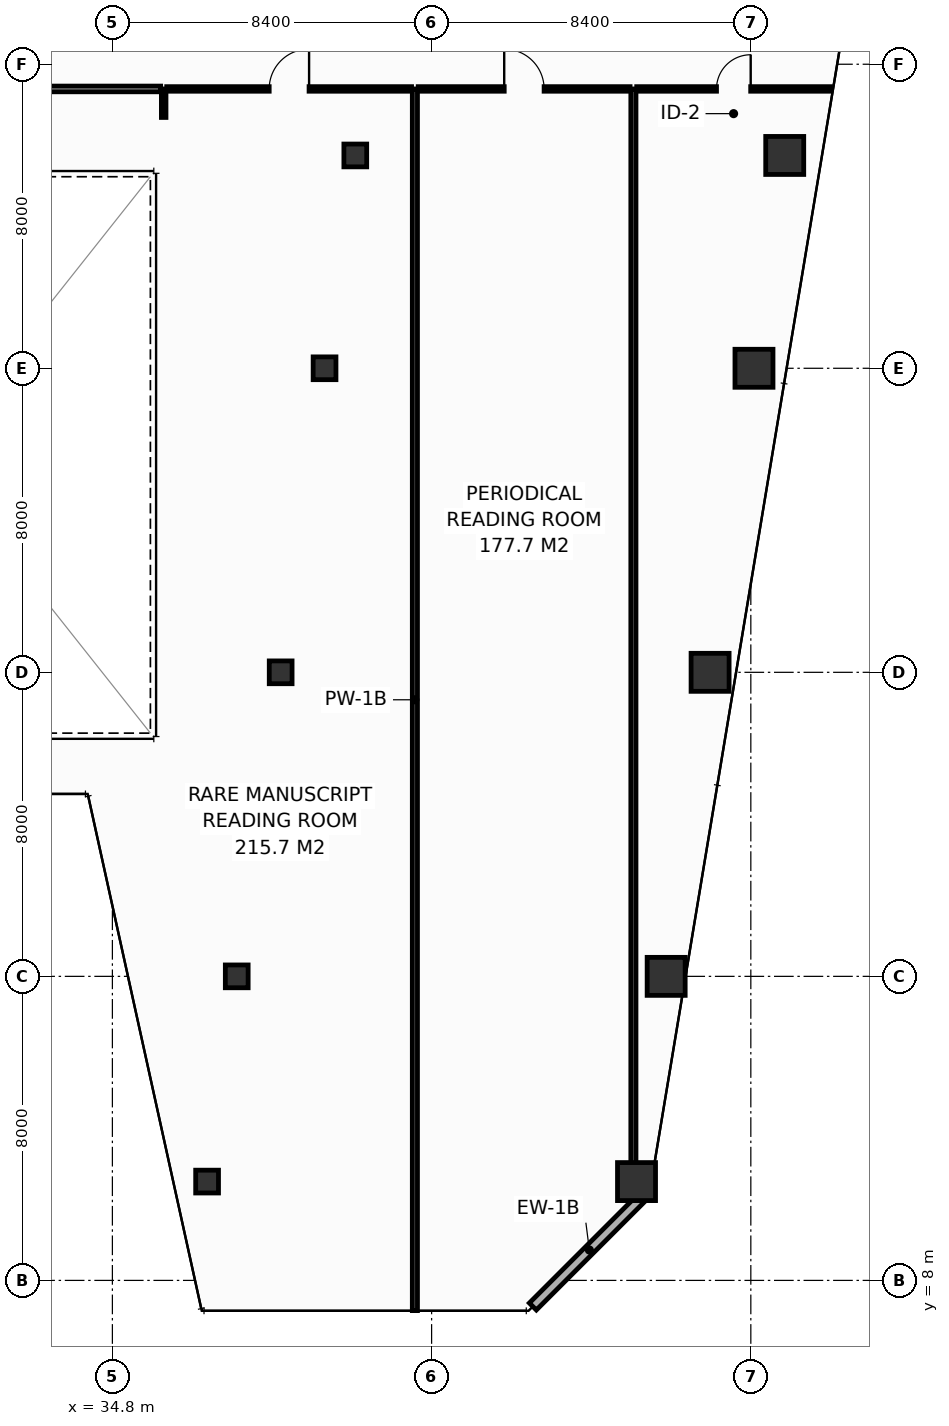
"""IFC4 building model, lengths in metres.
Left out: names, types, materials, properties, quantities, classifications, styles, units other than length and angle.
Written with IfcOpenShell. Run it as: python <this file> out.ifc"""

import sys

from ifc_helpers import new_model, si_unit, direction, frame, frame_2d, origin, origin_2d, place, context, subcontext, project, spatial, rectangle, hollow_rectangle, extrude, element, fill, save


model = new_model("IFC4")
c1 = context("Model", 3, precision=1e-05, world=origin(), true_north=direction((0.0, 1.0)))
c2 = subcontext(c1, "Body", "Model", "MODEL_VIEW")
j1 = project(units=[si_unit("LENGTHUNIT", "METRE"), si_unit("PLANEANGLEUNIT", "RADIAN")], contexts=[c1])
p1 = place(None, origin())
s1 = spatial("IfcSite", under=j1, at=p1, CompositionType="ELEMENT")
p2 = place(p1, origin())
s2 = spatial("IfcBuilding", under=s1, at=p2, CompositionType="ELEMENT")
p3 = place(p2, frame((0.0, 0.0, 156.2)))
s3 = spatial("IfcBuildingStorey", under=s2, at=p3, CompositionType="ELEMENT", Elevation=156.2)
p4 = place(p3, frame((48.592, 10.6, 0.0), z_axis=(0.0, 0.0, 1.0), x_axis=(1.0, 0.0, 0.0)))
e1 = element("IfcColumn", 1, at=p4, inside=s3, PredefinedType="COLUMN", context=c2, shape_type="SweptSolid", body=[
    extrude(hollow_rectangle(XDim=1.0, YDim=1.0, WallThickness=0.045, at=origin_2d()), origin(), (0.0, 0.0, 1.0), 3.8),
])
p5 = place(p3, frame((37.292, 10.6, 0.0), z_axis=(0.0, 0.0, 1.0), x_axis=(1.0, 0.0, 0.0)))
e2 = element("IfcColumn", 2, at=p5, inside=s3, PredefinedType="COLUMN", context=c2, shape_type="SweptSolid", body=[
    extrude(hollow_rectangle(XDim=0.6, YDim=0.6, WallThickness=0.028, at=origin_2d()), origin(), (0.0, 0.0, 1.0), 3.8),
])
p6 = place(p3, frame((49.372, 16.0, 0.0), z_axis=(0.0, 0.0, 1.0), x_axis=(1.0, 0.0, 0.0)))
e3 = element("IfcColumn", 3, at=p6, inside=s3, PredefinedType="COLUMN", context=c2, shape_type="SweptSolid", body=[
    extrude(hollow_rectangle(XDim=1.0, YDim=1.0, WallThickness=0.045, at=origin_2d()), origin(), (0.0, 0.0, 1.0), 3.8),
])
p7 = place(p3, frame((38.072, 16.0, 0.0), z_axis=(0.0, 0.0, 1.0), x_axis=(1.0, 0.0, 0.0)))
e4 = element("IfcColumn", 4, at=p7, inside=s3, PredefinedType="COLUMN", context=c2, shape_type="SweptSolid", body=[
    extrude(hollow_rectangle(XDim=0.6, YDim=0.6, WallThickness=0.028, at=origin_2d()), origin(), (0.0, 0.0, 1.0), 3.8),
])
p8 = place(p3, frame((50.528, 24.0, 0.0), z_axis=(0.0, 0.0, 1.0), x_axis=(1.0, 0.0, 0.0)))
e5 = element("IfcColumn", 5, at=p8, inside=s3, PredefinedType="COLUMN", context=c2, shape_type="SweptSolid", body=[
    extrude(hollow_rectangle(XDim=1.0, YDim=1.0, WallThickness=0.045, at=origin_2d()), origin(), (0.0, 0.0, 1.0), 3.8),
])
p9 = place(p3, frame((39.228, 24.0, 0.0), z_axis=(0.0, 0.0, 1.0), x_axis=(1.0, 0.0, 0.0)))
e6 = element("IfcColumn", 6, at=p9, inside=s3, PredefinedType="COLUMN", context=c2, shape_type="SweptSolid", body=[
    extrude(hollow_rectangle(XDim=0.6, YDim=0.6, WallThickness=0.028, at=origin_2d()), origin(), (0.0, 0.0, 1.0), 3.8),
])
p10 = place(p3, frame((51.683, 32.0, 0.0), z_axis=(0.0, 0.0, 1.0), x_axis=(1.0, 0.0, 0.0)))
e7 = element("IfcColumn", 7, at=p10, inside=s3, PredefinedType="COLUMN", context=c2, shape_type="SweptSolid", body=[
    extrude(hollow_rectangle(XDim=1.0, YDim=1.0, WallThickness=0.045, at=origin_2d()), origin(), (0.0, 0.0, 1.0), 3.8),
])
p11 = place(p3, frame((40.383, 32.0, 0.0), z_axis=(0.0, 0.0, 1.0), x_axis=(1.0, 0.0, 0.0)))
e8 = element("IfcColumn", 8, at=p11, inside=s3, PredefinedType="COLUMN", context=c2, shape_type="SweptSolid", body=[
    extrude(hollow_rectangle(XDim=0.6, YDim=0.6, WallThickness=0.028, at=origin_2d()), origin(), (0.0, 0.0, 1.0), 3.8),
])
p12 = place(p3, frame((52.492, 37.6, 0.0), z_axis=(0.0, 0.0, 1.0), x_axis=(1.0, 0.0, 0.0)))
e9 = element("IfcColumn", 9, at=p12, inside=s3, PredefinedType="COLUMN", context=c2, shape_type="SweptSolid", body=[
    extrude(hollow_rectangle(XDim=1.0, YDim=1.0, WallThickness=0.045, at=origin_2d()), origin(), (0.0, 0.0, 1.0), 3.8),
])
p13 = place(p3, frame((41.192, 37.6, 0.0), z_axis=(0.0, 0.0, 1.0), x_axis=(1.0, 0.0, 0.0)))
e10 = element("IfcColumn", 10, at=p13, inside=s3, PredefinedType="COLUMN", context=c2, shape_type="SweptSolid", body=[
    extrude(hollow_rectangle(XDim=0.6, YDim=0.6, WallThickness=0.028, at=origin_2d()), origin(), (0.0, 0.0, 1.0), 3.8),
])
p14 = place(p3, frame((45.864, 7.313, 0.0), z_axis=(0.0, 0.0, 1.0), x_axis=(0.70707775441, 0.707135806771, 0.0)))
e11 = element("IfcWall", 11, at=p14, inside=s3, PredefinedType="STANDARD", context=c2, shape_type="SweptSolid", body=[
    extrude(rectangle(XDim=4.206, YDim=0.26, at=frame_2d((2.103, 0.0))), origin(), (0.0, 0.0, 1.0), 3.55),
])
p15 = place(p3, frame((42.76, 7.205, 0.0), z_axis=(0.0, 0.0, 1.0), x_axis=(0.0, 1.0, 0.0)))
e12 = element("IfcWall", 12, at=p15, inside=s3, PredefinedType="PARTITIONING", context=c2, shape_type="SweptSolid", body=[
    extrude(rectangle(XDim=32.145, YDim=0.135, at=frame_2d((16.073, 0.0))), origin(), (0.0, 0.0, 1.0), 2.835),
])
p16 = place(p3, frame((48.51, 10.171, 0.0), z_axis=(0.0, 0.0, 1.0), x_axis=(0.0, 1.0, 0.0)))
e13 = element("IfcWall", 13, at=p16, inside=s3, PredefinedType="PARTITIONING", context=c2, shape_type="SweptSolid", body=[
    extrude(rectangle(XDim=29.179, YDim=0.135, at=frame_2d((14.59, 0.0))), origin(), (0.0, 0.0, 1.0), 2.835),
])
p17 = place(p3, frame((36.15, 38.6, 0.0), z_axis=(0.0, 0.0, 1.0), x_axis=(0.0, 1.0, 0.0)))
e14 = element("IfcWall", 14, at=p17, inside=s3, PredefinedType="PARTITIONING", context=c2, shape_type="SweptSolid", body=[
    extrude(rectangle(XDim=0.75, YDim=0.12, at=frame_2d((0.375, 0.0))), origin(), (0.0, 0.0, 1.0), 3.55),
])
p18 = place(p3, frame((23.93, 39.35, 0.0), z_axis=(0.0, 0.0, 1.0), x_axis=(1.0, 0.0, 0.0)))
e15 = element("IfcWall", 15, at=p18, inside=s3, PredefinedType="PARTITIONING", context=c2, shape_type="SweptSolid", body=[
    extrude(rectangle(XDim=12.14, YDim=0.15, at=frame_2d((6.07, 0.0))), origin(), (0.0, 0.0, 1.0), 3.55),
])
p19 = place(p3, frame((36.23, 39.35, 0.0), z_axis=(0.0, 0.0, 1.0), x_axis=(1.0, 0.0, 0.0)))
e16 = element("IfcWall", 16, at=p19, inside=s3, PredefinedType="PARTITIONING", context=c2, shape_type="SweptSolid", body=[
    extrude(rectangle(XDim=6.443, YDim=0.12, at=frame_2d((3.221, 0.0))), origin(), (0.0, 0.0, 1.0), 2.835),
])
p20 = place(p19, frame((2.696, 0.0, 0.0)))
e17 = element("IfcOpeningElement", 17, at=p20, cuts=e16, PredefinedType="OPENING", context=c2, shape_type="SweptSolid", body=[
    extrude(rectangle(XDim=1.05, YDim=2.15, at=frame_2d((0.525, 1.075))), frame((0.0, 0.07, 0.0), z_axis=(0.0, -1.0, 0.0), x_axis=(1.0, 0.0, 0.0)), (0.0, 0.0, 1.0), 0.14),
])
p21 = place(p3, frame((42.847, 39.35, 0.0), z_axis=(0.0, 0.0, 1.0), x_axis=(1.0, 0.0, 0.0)))
e18 = element("IfcWall", 18, at=p21, inside=s3, PredefinedType="PARTITIONING", context=c2, shape_type="SweptSolid", body=[
    extrude(rectangle(XDim=5.575, YDim=0.12, at=frame_2d((2.788, 0.0))), origin(), (0.0, 0.0, 1.0), 3.55),
])
p22 = place(p21, frame((2.263, 0.0, 0.0)))
e19 = element("IfcOpeningElement", 19, at=p22, cuts=e18, PredefinedType="OPENING", context=c2, shape_type="SweptSolid", body=[
    extrude(rectangle(XDim=1.05, YDim=2.15, at=frame_2d((0.525, 1.075))), frame((0.0, 0.07, 0.0), z_axis=(0.0, -1.0, 0.0), x_axis=(1.0, 0.0, 0.0)), (0.0, 0.0, 1.0), 0.14),
])
p23 = place(p3, frame((48.597, 39.35, 0.0), z_axis=(0.0, 0.0, 1.0), x_axis=(1.0, 0.0, 0.0)))
e20 = element("IfcWall", 20, at=p23, inside=s3, PredefinedType="PARTITIONING", context=c2, shape_type="SweptSolid", body=[
    extrude(rectangle(XDim=5.098, YDim=0.12, at=frame_2d((2.549, 0.0))), origin(), (0.0, 0.0, 1.0), 3.035),
])
p24 = place(p23, frame((2.099, 0.0, 0.0)))
e21 = element("IfcOpeningElement", 21, at=p24, cuts=e20, PredefinedType="OPENING", context=c2, shape_type="SweptSolid", body=[
    extrude(rectangle(XDim=0.9, YDim=2.1, at=frame_2d((0.45, 1.05))), frame((0.0, 0.07, 0.0), z_axis=(0.0, -1.0, 0.0), x_axis=(1.0, 0.0, 0.0)), (0.0, 0.0, 1.0), 0.14),
])
p25 = place(p20, origin())
e22 = element("IfcDoor", 22, at=p25, inside=s3, OperationType="SINGLE_SWING_RIGHT", PredefinedType="DOOR", context=c2, shape_type="SweptSolid", body=[
    extrude(rectangle(XDim=1.05, YDim=2.15, at=frame_2d((0.525, 1.075))), frame((0.0, 0.025, 0.0), z_axis=(0.0, -1.0, 0.0), x_axis=(1.0, 0.0, 0.0)), (0.0, 0.0, 1.0), 0.05),
])
fill(e17, e22)
p26 = place(p22, origin())
e23 = element("IfcDoor", 23, at=p26, inside=s3, OperationType="SINGLE_SWING_LEFT", PredefinedType="DOOR", context=c2, shape_type="SweptSolid", body=[
    extrude(rectangle(XDim=1.05, YDim=2.15, at=frame_2d((0.525, 1.075))), frame((0.0, 0.025, 0.0), z_axis=(0.0, -1.0, 0.0), x_axis=(1.0, 0.0, 0.0)), (0.0, 0.0, 1.0), 0.05),
])
fill(e19, e23)
p27 = place(p24, origin())
e24 = element("IfcDoor", 24, at=p27, inside=s3, OperationType="SINGLE_SWING_RIGHT", PredefinedType="DOOR", context=c2, shape_type="SweptSolid", body=[
    extrude(rectangle(XDim=0.9, YDim=2.1, at=frame_2d((0.45, 1.05))), frame((0.0, 0.025, 0.0), z_axis=(0.0, -1.0, 0.0), x_axis=(1.0, 0.0, 0.0)), (0.0, 0.0, 1.0), 0.05),
])
fill(e21, e24)
save(model, sys.argv[1])
